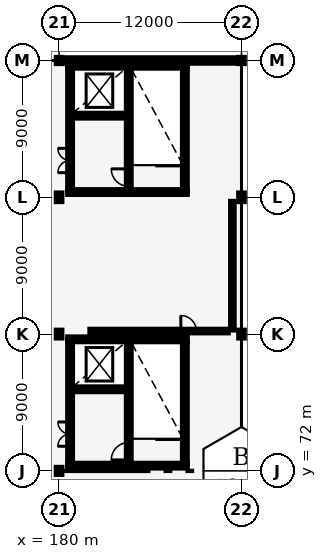
"""IFC4 building model, lengths in metres.
Left out: names, types, materials, properties, quantities, classifications, styles, units other than length and angle.
Written with IfcOpenShell. Run it as: python <this file> out.ifc"""

import sys

from ifc_helpers import new_model, si_unit, direction, frame, frame_2d, origin, origin_2d, place, context, subcontext, project, spatial, rectangle, i_section, extrude, element, fill, save


model = new_model("IFC4")
c1 = context("Model", 3, precision=1e-05, world=origin(), true_north=direction((0.0, 1.0)))
c2 = subcontext(c1, "Body", "Model", "MODEL_VIEW")
j1 = project(units=[si_unit("LENGTHUNIT", "METRE"), si_unit("PLANEANGLEUNIT", "RADIAN")], contexts=[c1])
p1 = place(None, origin())
s1 = spatial("IfcSite", under=j1, at=p1, CompositionType="ELEMENT")
p2 = place(p1, origin())
s2 = spatial("IfcBuilding", under=s1, at=p2, CompositionType="ELEMENT")
p3 = place(p2, frame((0.0, 0.0, 26.8)))
s3 = spatial("IfcBuildingStorey", under=s2, at=p3, CompositionType="ELEMENT", Elevation=26.8)
p4 = place(p3, frame((180.0, 72.0, 0.0), z_axis=(0.0, 0.0, 1.0), x_axis=(1.0, 0.0, 0.0)))
e1 = element("IfcColumn", 1, at=p4, inside=s3, PredefinedType="COLUMN", context=c2, shape_type="SweptSolid", body=[
    extrude(i_section(OverallWidth=0.3, OverallDepth=0.4, WebThickness=0.013, FlangeThickness=0.024, FilletRadius=0.027, at=origin_2d()), origin(), (0.0, 0.0, 1.0), 3.0),
])
p5 = place(p3, frame((180.0, 81.0, 0.0), z_axis=(0.0, 0.0, 1.0), x_axis=(1.0, 0.0, 0.0)))
e2 = element("IfcColumn", 2, at=p5, inside=s3, PredefinedType="COLUMN", context=c2, shape_type="SweptSolid", body=[
    extrude(i_section(OverallWidth=0.3, OverallDepth=0.45, WebThickness=0.014, FlangeThickness=0.026, FilletRadius=0.027, at=origin_2d()), origin(), (0.0, 0.0, 1.0), 3.0),
])
p6 = place(p3, frame((180.0, 90.0, 0.0), z_axis=(0.0, 0.0, 1.0), x_axis=(1.0, 0.0, 0.0)))
e3 = element("IfcColumn", 3, at=p6, inside=s3, PredefinedType="COLUMN", context=c2, shape_type="SweptSolid", body=[
    extrude(i_section(OverallWidth=0.3, OverallDepth=0.5, WebThickness=0.014, FlangeThickness=0.028, FilletRadius=0.027, at=origin_2d()), origin(), (0.0, 0.0, 1.0), 3.0),
])
p7 = place(p3, frame((180.0, 99.0, 0.0), z_axis=(0.0, 0.0, 1.0), x_axis=(1.0, 0.0, 0.0)))
e4 = element("IfcColumn", 4, at=p7, inside=s3, PredefinedType="COLUMN", context=c2, shape_type="SweptSolid", body=[
    extrude(i_section(OverallWidth=0.3, OverallDepth=0.34, WebThickness=0.012, FlangeThickness=0.021, FilletRadius=0.027, at=origin_2d()), origin(), (0.0, 0.0, 1.0), 3.0),
])
p8 = place(p3, frame((192.0, 72.0, 0.0), z_axis=(0.0, 0.0, 1.0), x_axis=(1.0, 0.0, 0.0)))
e5 = element("IfcColumn", 5, at=p8, inside=s3, PredefinedType="COLUMN", context=c2, shape_type="SweptSolid", body=[
    extrude(i_section(OverallWidth=0.3, OverallDepth=0.4, WebThickness=0.013, FlangeThickness=0.024, FilletRadius=0.027, at=origin_2d()), origin(), (0.0, 0.0, 1.0), 3.0),
])
p9 = place(p3, frame((192.0, 81.0, 0.0), z_axis=(0.0, 0.0, 1.0), x_axis=(1.0, 0.0, 0.0)))
e6 = element("IfcColumn", 6, at=p9, inside=s3, PredefinedType="COLUMN", context=c2, shape_type="SweptSolid", body=[
    extrude(i_section(OverallWidth=0.3, OverallDepth=0.45, WebThickness=0.014, FlangeThickness=0.026, FilletRadius=0.027, at=origin_2d()), origin(), (0.0, 0.0, 1.0), 3.0),
])
p10 = place(p3, frame((192.0, 90.0, 0.0), z_axis=(0.0, 0.0, 1.0), x_axis=(1.0, 0.0, 0.0)))
e7 = element("IfcColumn", 7, at=p10, inside=s3, PredefinedType="COLUMN", context=c2, shape_type="SweptSolid", body=[
    extrude(i_section(OverallWidth=0.3, OverallDepth=0.5, WebThickness=0.014, FlangeThickness=0.028, FilletRadius=0.027, at=origin_2d()), origin(), (0.0, 0.0, 1.0), 3.0),
])
p11 = place(p3, frame((192.0, 99.0, 0.0), z_axis=(0.0, 0.0, 1.0), x_axis=(1.0, 0.0, 0.0)))
e8 = element("IfcColumn", 8, at=p11, inside=s3, PredefinedType="COLUMN", context=c2, shape_type="SweptSolid", body=[
    extrude(i_section(OverallWidth=0.3, OverallDepth=0.34, WebThickness=0.012, FlangeThickness=0.021, FilletRadius=0.027, at=origin_2d()), origin(), (0.0, 0.0, 1.0), 3.0),
])
p12 = place(p3, frame((180.145, 99.0, 0.0), z_axis=(0.0, 0.0, 1.0), x_axis=(1.0, 0.0, 0.0)))
e9 = element("IfcWall", 9, at=p12, inside=s3, PredefinedType="SOLIDWALL", context=c2, shape_type="SweptSolid", body=[
    extrude(rectangle(XDim=11.71, YDim=0.29, at=frame_2d((5.855, 0.0))), origin(), (0.0, 0.0, 1.0), 1.9),
])
p13 = place(p3, frame((180.725, 72.47, 0.0), z_axis=(0.0, 0.0, 1.0), x_axis=(0.0, 1.0, 0.0)))
e10 = element("IfcWall", 10, at=p13, inside=s3, PredefinedType="SHEAR", context=c2, shape_type="SweptSolid", body=[
    extrude(rectangle(XDim=8.06, YDim=0.25, at=frame_2d((4.03, 0.0))), origin(), (0.0, 0.0, 1.0), 2.64),
])
p14 = place(p13, frame((1.15, 0.0, 0.0)))
e11 = element("IfcOpeningElement", 11, at=p14, cuts=e10, PredefinedType="OPENING", context=c2, shape_type="SweptSolid", body=[
    extrude(rectangle(XDim=1.6, YDim=2.2, at=frame_2d((0.8, 1.1))), frame((0.0, 0.135, 0.0), z_axis=(0.0, -1.0, 0.0), x_axis=(1.0, 0.0, 0.0)), (0.0, 0.0, 1.0), 0.27),
])
p15 = place(p3, frame((188.275, 72.47, 0.0), z_axis=(0.0, 0.0, 1.0), x_axis=(0.0, 1.0, 0.0)))
e12 = element("IfcWall", 12, at=p15, inside=s3, PredefinedType="SHEAR", context=c2, shape_type="SweptSolid", body=[
    extrude(rectangle(XDim=8.06, YDim=0.25, at=frame_2d((4.03, 0.0))), origin(), (0.0, 0.0, 1.0), 2.64),
])
for number, where, z_axis, x_axis in (
    (13, (180.6, 72.345, 0.0), (0.0, 0.0, 1.0), (1.0, 0.0, 0.0)),
    (14, (180.6, 80.655, 0.0), (0.0, 0.0, 1.0), (1.0, 0.0, 0.0)),
):
    element("IfcWall", number, at=place(p3, frame(where, z_axis=z_axis, x_axis=x_axis)), inside=s3, PredefinedType="SHEAR", context=c2, shape_type="SweptSolid", body=[
        extrude(rectangle(XDim=7.8, YDim=0.25, at=frame_2d((3.9, 0.0))), origin(), (0.0, 0.0, 1.0), 2.64),
    ])
p16 = place(p3, frame((184.585, 72.47, 0.0), z_axis=(0.0, 0.0, 1.0), x_axis=(0.0, 1.0, 0.0)))
e15 = element("IfcWall", 15, at=p16, inside=s3, PredefinedType="SHEAR", context=c2, shape_type="SweptSolid", body=[
    extrude(rectangle(XDim=8.06, YDim=0.25, at=frame_2d((4.03, 0.0))), origin(), (0.0, 0.0, 1.0), 2.64),
])
p17 = place(p16, frame((0.25, 0.0, 0.0)))
e16 = element("IfcOpeningElement", 16, at=p17, cuts=e15, PredefinedType="OPENING", context=c2, shape_type="SweptSolid", body=[
    extrude(rectangle(XDim=1.15, YDim=2.15, at=frame_2d((0.575, 1.075))), frame((0.0, 0.135, 0.0), z_axis=(0.0, -1.0, 0.0), x_axis=(1.0, 0.0, 0.0)), (0.0, 0.0, 1.0), 0.27),
])
p18 = place(p3, frame((180.85, 77.37, 0.0), z_axis=(0.0, 0.0, 1.0), x_axis=(1.0, 0.0, 0.0)))
e17 = element("IfcWall", 17, at=p18, inside=s3, PredefinedType="SHEAR", context=c2, shape_type="SweptSolid", body=[
    extrude(rectangle(XDim=3.61, YDim=0.25, at=frame_2d((1.805, 0.0))), origin(), (0.0, 0.0, 1.0), 2.64),
])
p19 = place(p18, frame((1.0, 0.0, 0.0)))
e18 = element("IfcOpeningElement", 18, at=p19, cuts=e17, PredefinedType="OPENING", context=c2, shape_type="SweptSolid", body=[
    extrude(rectangle(XDim=1.1, YDim=2.1, at=frame_2d((0.55, 1.05))), frame((0.0, 0.135, 0.0), z_axis=(0.0, -1.0, 0.0), x_axis=(1.0, 0.0, 0.0)), (0.0, 0.0, 1.0), 0.27),
])
p20 = place(p3, frame((180.725, 90.47, 0.0), z_axis=(0.0, 0.0, 1.0), x_axis=(0.0, 1.0, 0.0)))
e19 = element("IfcWall", 19, at=p20, inside=s3, PredefinedType="SHEAR", context=c2, shape_type="SweptSolid", body=[
    extrude(rectangle(XDim=8.06, YDim=0.25, at=frame_2d((4.03, 0.0))), origin(), (0.0, 0.0, 1.0), 2.64),
])
p21 = place(p20, frame((1.15, 0.0, 0.0)))
e20 = element("IfcOpeningElement", 20, at=p21, cuts=e19, PredefinedType="OPENING", context=c2, shape_type="SweptSolid", body=[
    extrude(rectangle(XDim=1.6, YDim=2.2, at=frame_2d((0.8, 1.1))), frame((0.0, 0.135, 0.0), z_axis=(0.0, -1.0, 0.0), x_axis=(1.0, 0.0, 0.0)), (0.0, 0.0, 1.0), 0.27),
])
p22 = place(p3, frame((188.275, 90.47, 0.0), z_axis=(0.0, 0.0, 1.0), x_axis=(0.0, 1.0, 0.0)))
e21 = element("IfcWall", 21, at=p22, inside=s3, PredefinedType="SHEAR", context=c2, shape_type="SweptSolid", body=[
    extrude(rectangle(XDim=8.06, YDim=0.25, at=frame_2d((4.03, 0.0))), origin(), (0.0, 0.0, 1.0), 2.64),
])
for number, where, z_axis, x_axis in (
    (22, (180.6, 90.345, 0.0), (0.0, 0.0, 1.0), (1.0, 0.0, 0.0)),
    (23, (180.6, 98.655, 0.0), (0.0, 0.0, 1.0), (1.0, 0.0, 0.0)),
):
    element("IfcWall", number, at=place(p3, frame(where, z_axis=z_axis, x_axis=x_axis)), inside=s3, PredefinedType="SHEAR", context=c2, shape_type="SweptSolid", body=[
        extrude(rectangle(XDim=7.8, YDim=0.25, at=frame_2d((3.9, 0.0))), origin(), (0.0, 0.0, 1.0), 2.64),
    ])
p23 = place(p3, frame((184.585, 90.47, 0.0), z_axis=(0.0, 0.0, 1.0), x_axis=(0.0, 1.0, 0.0)))
e24 = element("IfcWall", 24, at=p23, inside=s3, PredefinedType="SHEAR", context=c2, shape_type="SweptSolid", body=[
    extrude(rectangle(XDim=8.06, YDim=0.25, at=frame_2d((4.03, 0.0))), origin(), (0.0, 0.0, 1.0), 2.64),
])
p24 = place(p23, frame((0.25, 0.0, 0.0)))
e25 = element("IfcOpeningElement", 25, at=p24, cuts=e24, PredefinedType="OPENING", context=c2, shape_type="SweptSolid", body=[
    extrude(rectangle(XDim=1.15, YDim=2.15, at=frame_2d((0.575, 1.075))), frame((0.0, 0.135, 0.0), z_axis=(0.0, -1.0, 0.0), x_axis=(1.0, 0.0, 0.0)), (0.0, 0.0, 1.0), 0.27),
])
p25 = place(p3, frame((180.85, 95.37, 0.0), z_axis=(0.0, 0.0, 1.0), x_axis=(1.0, 0.0, 0.0)))
e26 = element("IfcWall", 26, at=p25, inside=s3, PredefinedType="SHEAR", context=c2, shape_type="SweptSolid", body=[
    extrude(rectangle(XDim=3.61, YDim=0.25, at=frame_2d((1.805, 0.0))), origin(), (0.0, 0.0, 1.0), 2.64),
])
p26 = place(p25, frame((1.0, 0.0, 0.0)))
e27 = element("IfcOpeningElement", 27, at=p26, cuts=e26, PredefinedType="OPENING", context=c2, shape_type="SweptSolid", body=[
    extrude(rectangle(XDim=1.1, YDim=2.1, at=frame_2d((0.55, 1.05))), frame((0.0, 0.135, 0.0), z_axis=(0.0, -1.0, 0.0), x_axis=(1.0, 0.0, 0.0)), (0.0, 0.0, 1.0), 0.27),
])
p27 = place(p3, frame((191.4, 63.257, 0.0), z_axis=(0.0, 0.0, 1.0), x_axis=(0.0, 1.0, 0.0)))
e28 = element("IfcWall", 28, at=p27, inside=s3, PredefinedType="PARTITIONING", context=c2, shape_type="SweptSolid", body=[
    extrude(rectangle(XDim=8.486, YDim=0.095, at=frame_2d((4.243, 0.0))), origin(), (0.0, 0.0, 1.0), 2.35),
])
p28 = place(p3, frame((182.06, 81.2, 0.0), z_axis=(0.0, 0.0, 1.0), x_axis=(1.0, 0.0, 0.0)))
e29 = element("IfcWall", 29, at=p28, inside=s3, PredefinedType="PARTITIONING", context=c2, shape_type="SweptSolid", body=[
    extrude(rectangle(XDim=9.04, YDim=0.17, at=frame_2d((4.52, 0.0))), origin(), (0.0, 0.0, 1.0), 2.35),
])
p29 = place(p28, frame((5.95, 0.0, 0.0)))
e30 = element("IfcOpeningElement", 30, at=p29, cuts=e29, PredefinedType="OPENING", context=c2, shape_type="SweptSolid", body=[
    extrude(rectangle(XDim=1.02, YDim=2.15, at=frame_2d((0.51, 1.075))), frame((0.0, 0.095, 0.0), z_axis=(0.0, -1.0, 0.0), x_axis=(1.0, 0.0, 0.0)), (0.0, 0.0, 1.0), 0.19),
])
p30 = place(p3, frame((191.4, 81.302, 0.0), z_axis=(0.0, 0.0, 1.0), x_axis=(0.0, 1.0, 0.0)))
e31 = element("IfcWall", 31, at=p30, inside=s3, PredefinedType="PARTITIONING", context=c2, shape_type="SweptSolid", body=[
    extrude(rectangle(XDim=8.396, YDim=0.17, at=frame_2d((4.198, 0.0))), origin(), (0.0, 0.0, 1.0), 2.35),
])
p31 = place(p17, origin())
e32 = element("IfcDoor", 32, at=p31, inside=s3, OperationType="SINGLE_SWING_LEFT", PredefinedType="DOOR", context=c2, shape_type="SweptSolid", body=[
    extrude(rectangle(XDim=1.15, YDim=2.15, at=frame_2d((0.575, 1.075))), frame((0.0, 0.025, 0.0), z_axis=(0.0, -1.0, 0.0), x_axis=(1.0, 0.0, 0.0)), (0.0, 0.0, 1.0), 0.05),
])
fill(e16, e32)
p32 = place(p19, origin())
e33 = element("IfcDoor", 33, at=p32, inside=s3, OperationType="DOUBLE_DOOR_SLIDING", PredefinedType="DOOR", context=c2, shape_type="SweptSolid", body=[
    extrude(rectangle(XDim=1.1, YDim=2.1, at=frame_2d((0.55, 1.05))), frame((0.0, 0.025, 0.0), z_axis=(0.0, -1.0, 0.0), x_axis=(1.0, 0.0, 0.0)), (0.0, 0.0, 1.0), 0.05),
])
fill(e18, e33)
p33 = place(p14, origin())
e34 = element("IfcDoor", 34, at=p33, inside=s3, OperationType="DOUBLE_DOOR_SINGLE_SWING", PredefinedType="DOOR", context=c2, shape_type="SweptSolid", body=[
    extrude(rectangle(XDim=1.6, YDim=2.2, at=frame_2d((0.8, 1.1))), frame((0.0, 0.025, 0.0), z_axis=(0.0, -1.0, 0.0), x_axis=(1.0, 0.0, 0.0)), (0.0, 0.0, 1.0), 0.05),
])
fill(e11, e34)
p34 = place(p24, origin())
e35 = element("IfcDoor", 35, at=p34, inside=s3, OperationType="SINGLE_SWING_RIGHT", PredefinedType="DOOR", context=c2, shape_type="SweptSolid", body=[
    extrude(rectangle(XDim=1.15, YDim=2.15, at=frame_2d((0.575, 1.075))), frame((0.0, 0.025, 0.0), z_axis=(0.0, -1.0, 0.0), x_axis=(1.0, 0.0, 0.0)), (0.0, 0.0, 1.0), 0.05),
])
fill(e25, e35)
p35 = place(p26, origin())
e36 = element("IfcDoor", 36, at=p35, inside=s3, OperationType="DOUBLE_DOOR_SLIDING", PredefinedType="DOOR", context=c2, shape_type="SweptSolid", body=[
    extrude(rectangle(XDim=1.1, YDim=2.1, at=frame_2d((0.55, 1.05))), frame((0.0, 0.025, 0.0), z_axis=(0.0, -1.0, 0.0), x_axis=(1.0, 0.0, 0.0)), (0.0, 0.0, 1.0), 0.05),
])
fill(e27, e36)
p36 = place(p21, origin())
e37 = element("IfcDoor", 37, at=p36, inside=s3, OperationType="DOUBLE_DOOR_SINGLE_SWING", PredefinedType="DOOR", context=c2, shape_type="SweptSolid", body=[
    extrude(rectangle(XDim=1.6, YDim=2.2, at=frame_2d((0.8, 1.1))), frame((0.0, 0.025, 0.0), z_axis=(0.0, -1.0, 0.0), x_axis=(1.0, 0.0, 0.0)), (0.0, 0.0, 1.0), 0.05),
])
fill(e20, e37)
p37 = place(p29, origin())
e38 = element("IfcDoor", 38, at=p37, inside=s3, OperationType="SINGLE_SWING_LEFT", PredefinedType="DOOR", context=c2, shape_type="SweptSolid", body=[
    extrude(rectangle(XDim=1.02, YDim=2.15, at=frame_2d((0.51, 1.075))), frame((0.0, 0.025, 0.0), z_axis=(0.0, -1.0, 0.0), x_axis=(1.0, 0.0, 0.0)), (0.0, 0.0, 1.0), 0.05),
])
fill(e30, e38)
save(model, sys.argv[1])
